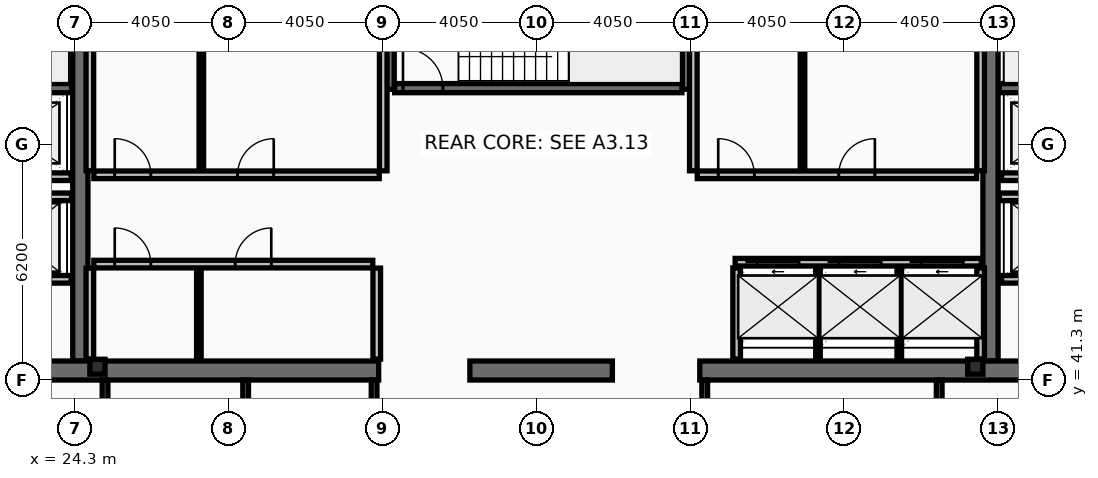
"""IFC4 building model, lengths in metres.
Left out: names, types, materials, properties, quantities, classifications, styles, units other than length and angle.
Written with IfcOpenShell. Run it as: python <this file> out.ifc"""

import sys

from ifc_helpers import new_model, si_unit, direction, frame, frame_2d, origin, origin_2d, place, context, subcontext, project, spatial, rectangle, i_section, extrude, element, fill, save


model = new_model("IFC4")
c1 = context("Model", 3, precision=1e-05, world=origin(), true_north=direction((0.0, 1.0)))
c2 = subcontext(c1, "Body", "Model", "MODEL_VIEW")
j1 = project(units=[si_unit("LENGTHUNIT", "METRE"), si_unit("PLANEANGLEUNIT", "RADIAN")], contexts=[c1])
p1 = place(None, origin())
s1 = spatial("IfcSite", under=j1, at=p1, CompositionType="ELEMENT")
p2 = place(p1, origin())
s2 = spatial("IfcBuilding", under=s1, at=p2, CompositionType="ELEMENT")
p3 = place(p2, frame((0.0, 0.0, 325.4)))
s3 = spatial("IfcBuildingStorey", under=s2, at=p3, CompositionType="ELEMENT", Elevation=325.4)
for number, where, z_axis, x_axis in (
    (1, (24.45, 41.8, 0.0), (0.0, 0.0, 1.0), (0.0, 1.0, 0.0)),
    (2, (48.4, 41.8, 0.0), (0.0, 0.0, 1.0), (0.0, 1.0, 0.0)),
):
    element("IfcWall", number, at=place(p3, frame(where, z_axis=z_axis, x_axis=x_axis)), inside=s3, PredefinedType="SHEAR", context=c2, shape_type="SweptSolid", body=[
        extrude(rectangle(XDim=11.4, YDim=0.4, at=frame_2d((5.7, 0.0))), origin(), (0.0, 0.0, 1.0), 3.44),
    ])
p4 = place(p3, frame((32.3, 41.55, 0.0), z_axis=(0.0, 0.0, 1.0), x_axis=(-1.0, 0.0, 0.0)))
e3 = element("IfcWall", 3, at=p4, inside=s3, PredefinedType="SHEAR", context=c2, shape_type="SweptSolid", body=[
    extrude(rectangle(XDim=11.45, YDim=0.5, at=frame_2d((5.725, 0.0))), origin(), (0.0, 0.0, 1.0), 3.44),
])
p5 = place(p3, frame((38.45, 41.55, 0.0), z_axis=(0.0, 0.0, 1.0), x_axis=(-1.0, 0.0, 0.0)))
e4 = element("IfcWall", 4, at=p5, inside=s3, PredefinedType="SHEAR", context=c2, shape_type="SweptSolid", body=[
    extrude(rectangle(XDim=3.75, YDim=0.5, at=frame_2d((1.875, 0.0))), origin(), (0.0, 0.0, 1.0), 3.44),
])
p6 = place(p3, frame((52.05, 41.55, 0.0), z_axis=(0.0, 0.0, 1.0), x_axis=(-1.0, 0.0, 0.0)))
e5 = element("IfcWall", 5, at=p6, inside=s3, PredefinedType="SHEAR", context=c2, shape_type="SweptSolid", body=[
    extrude(rectangle(XDim=11.3, YDim=0.5, at=frame_2d((5.65, 0.0))), origin(), (0.0, 0.0, 1.0), 3.44),
])
for number, where, z_axis, x_axis in (
    (6, (32.58, 48.95, 0.0), (0.0, 0.0, 1.0), (0.0, 1.0, 0.0)),
    (7, (40.42, 48.95, 0.0), (0.0, 0.0, 1.0), (0.0, 1.0, 0.0)),
):
    element("IfcWall", number, at=place(p3, frame(where, z_axis=z_axis, x_axis=x_axis)), inside=s3, PredefinedType="SHEAR", context=c2, shape_type="SweptSolid", body=[
        extrude(rectangle(XDim=4.25, YDim=0.26, at=frame_2d((2.125, 0.0))), origin(), (0.0, 0.0, 1.0), 3.44),
    ])
p7 = place(p3, frame((16.7, 48.98, 0.0), z_axis=(0.0, 0.0, 1.0), x_axis=(1.0, 0.0, 0.0)))
e8 = element("IfcWall", 8, at=p7, inside=s3, PredefinedType="SHEAR", context=c2, shape_type="SweptSolid", body=[
    extrude(rectangle(XDim=7.52, YDim=0.24, at=frame_2d((3.76, 0.0))), origin(), (0.0, 0.0, 1.0), 3.44),
])
p8 = place(p7, frame((0.22, 0.0, 0.0)))
e9 = element("IfcOpeningElement", 9, at=p8, cuts=e8, PredefinedType="OPENING", context=c2, shape_type="SweptSolid", body=[
    extrude(rectangle(XDim=1.05, YDim=2.15, at=frame_2d((0.525, 1.075))), frame((0.0, 0.13, 0.0), z_axis=(0.0, -1.0, 0.0), x_axis=(1.0, 0.0, 0.0)), (0.0, 0.0, 1.0), 0.26),
])
p9 = place(p3, frame((48.63, 48.98, 0.0), z_axis=(0.0, 0.0, 1.0), x_axis=(1.0, 0.0, 0.0)))
e10 = element("IfcWall", 10, at=p9, inside=s3, PredefinedType="SHEAR", context=c2, shape_type="SweptSolid", body=[
    extrude(rectangle(XDim=7.57, YDim=0.24, at=frame_2d((3.785, 0.0))), origin(), (0.0, 0.0, 1.0), 3.44),
])
p10 = place(p9, frame((6.3, 0.0, 0.0)))
e11 = element("IfcOpeningElement", 11, at=p10, cuts=e10, PredefinedType="OPENING", context=c2, shape_type="SweptSolid", body=[
    extrude(rectangle(XDim=1.05, YDim=2.15, at=frame_2d((0.525, 1.075))), frame((0.0, 0.13, 0.0), z_axis=(0.0, -1.0, 0.0), x_axis=(1.0, 0.0, 0.0)), (0.0, 0.0, 1.0), 0.26),
])
p11 = place(p3, frame((32.72, 48.98, 0.0), z_axis=(0.0, 0.0, 1.0), x_axis=(1.0, 0.0, 0.0)))
e12 = element("IfcWall", 12, at=p11, inside=s3, PredefinedType="SHEAR", context=c2, shape_type="SweptSolid", body=[
    extrude(rectangle(XDim=7.56, YDim=0.24, at=frame_2d((3.78, 0.0))), origin(), (0.0, 0.0, 1.0), 3.44),
])
p12 = place(p11, frame((0.22, 0.0, 0.0)))
e13 = element("IfcOpeningElement", 13, at=p12, cuts=e12, PredefinedType="OPENING", context=c2, shape_type="SweptSolid", body=[
    extrude(rectangle(XDim=1.05, YDim=2.15, at=frame_2d((0.525, 1.075))), frame((0.0, 0.13, 0.0), z_axis=(0.0, -1.0, 0.0), x_axis=(1.0, 0.0, 0.0)), (0.0, 0.0, 1.0), 0.26),
])
for number, where, z_axis, x_axis in (
    (14, (24.9, 41.65, 0.0), (0.0, 0.0, 1.0), (1.0, 0.0, 0.0)),
    (15, (48.0, 41.65, 0.0), (0.0, 0.0, 1.0), (1.0, 0.0, 0.0)),
):
    element("IfcColumn", number, at=place(p3, frame(where, z_axis=z_axis, x_axis=x_axis)), inside=s3, PredefinedType="COLUMN", context=c2, shape_type="SweptSolid", body=[
        extrude(i_section(OverallWidth=0.399, OverallDepth=0.393, WebThickness=0.023, FlangeThickness=0.037, at=origin_2d()), origin(), (0.0, 0.0, 1.0), 3.6),
    ])
p13 = place(p3, frame((41.68, 44.4, 0.0), z_axis=(0.0, 0.0, 1.0), x_axis=(1.0, 0.0, 0.0)))
e16 = element("IfcWall", 16, at=p13, inside=s3, PredefinedType="PARTITIONING", context=c2, shape_type="SweptSolid", body=[
    extrude(rectangle(XDim=6.48, YDim=0.2, at=frame_2d((3.24, 0.0))), origin(), (0.0, 0.0, 1.0), 3.44),
])
p14 = place(p13, frame((0.58, 0.0, 0.0)))
e17 = element("IfcOpeningElement", 17, at=p14, cuts=e16, PredefinedType="OPENING", context=c2, shape_type="SweptSolid", body=[
    extrude(rectangle(XDim=1.1, YDim=2.18, at=frame_2d((0.55, 1.09))), frame((0.0, 0.11, 0.0), z_axis=(0.0, -1.0, 0.0), x_axis=(1.0, 0.0, 0.0)), (0.0, 0.0, 1.0), 0.22),
])
p15 = place(p13, frame((2.74, 0.0, 0.0)))
e18 = element("IfcOpeningElement", 18, at=p15, cuts=e16, PredefinedType="OPENING", context=c2, shape_type="SweptSolid", body=[
    extrude(rectangle(XDim=1.1, YDim=2.18, at=frame_2d((0.55, 1.09))), frame((0.0, 0.11, 0.0), z_axis=(0.0, -1.0, 0.0), x_axis=(1.0, 0.0, 0.0)), (0.0, 0.0, 1.0), 0.22),
])
p16 = place(p13, frame((4.9, 0.0, 0.0)))
e19 = element("IfcOpeningElement", 19, at=p16, cuts=e16, PredefinedType="OPENING", context=c2, shape_type="SweptSolid", body=[
    extrude(rectangle(XDim=1.1, YDim=2.18, at=frame_2d((0.55, 1.09))), frame((0.0, 0.11, 0.0), z_axis=(0.0, -1.0, 0.0), x_axis=(1.0, 0.0, 0.0)), (0.0, 0.0, 1.0), 0.22),
])
p17 = place(p3, frame((51.61, 43.95, 0.0), z_axis=(0.0, 0.0, 1.0), x_axis=(-1.0, 0.0, 0.0)))
e20 = element("IfcWall", 20, at=p17, inside=s3, PredefinedType="PARTITIONING", context=c2, shape_type="SweptSolid", body=[
    extrude(rectangle(XDim=2.92, YDim=0.2, at=frame_2d((1.46, 0.0))), origin(), (0.0, 0.0, 1.0), 3.44),
])
p18 = place(p17, frame((0.81, 0.0, 0.0)))
e21 = element("IfcOpeningElement", 21, at=p18, cuts=e20, PredefinedType="OPENING", context=c2, shape_type="SweptSolid", body=[
    extrude(rectangle(XDim=1.3, YDim=2.18, at=frame_2d((0.65, 1.09))), frame((0.0, 0.11, 0.0), z_axis=(0.0, -1.0, 0.0), x_axis=(1.0, 0.0, 0.0)), (0.0, 0.0, 1.0), 0.22),
])
p19 = place(p3, frame((24.21, 43.95, 0.0), z_axis=(0.0, 0.0, 1.0), x_axis=(-1.0, 0.0, 0.0)))
e22 = element("IfcWall", 22, at=p19, inside=s3, PredefinedType="PARTITIONING", context=c2, shape_type="SweptSolid", body=[
    extrude(rectangle(XDim=2.97, YDim=0.2, at=frame_2d((1.485, 0.0))), origin(), (0.0, 0.0, 1.0), 3.44),
])
p20 = place(p19, frame((0.86, 0.0, 0.0)))
e23 = element("IfcOpeningElement", 23, at=p20, cuts=e22, PredefinedType="OPENING", context=c2, shape_type="SweptSolid", body=[
    extrude(rectangle(XDim=1.3, YDim=2.18, at=frame_2d((0.65, 1.09))), frame((0.0, 0.11, 0.0), z_axis=(0.0, -1.0, 0.0), x_axis=(1.0, 0.0, 0.0)), (0.0, 0.0, 1.0), 0.22),
])
p21 = place(p3, frame((51.61, 46.65, 0.0), z_axis=(0.0, 0.0, 1.0), x_axis=(-1.0, 0.0, 0.0)))
e24 = element("IfcWall", 24, at=p21, inside=s3, PredefinedType="PARTITIONING", context=c2, shape_type="SweptSolid", body=[
    extrude(rectangle(XDim=2.92, YDim=0.2, at=frame_2d((1.46, 0.0))), origin(), (0.0, 0.0, 1.0), 3.44),
])
p22 = place(p21, frame((0.86, 0.0, 0.0)))
e25 = element("IfcOpeningElement", 25, at=p22, cuts=e24, PredefinedType="OPENING", context=c2, shape_type="SweptSolid", body=[
    extrude(rectangle(XDim=1.2, YDim=2.18, at=frame_2d((0.6, 1.09))), frame((0.0, 0.11, 0.0), z_axis=(0.0, -1.0, 0.0), x_axis=(1.0, 0.0, 0.0)), (0.0, 0.0, 1.0), 0.22),
])
p23 = place(p3, frame((24.21, 46.65, 0.0), z_axis=(0.0, 0.0, 1.0), x_axis=(-1.0, 0.0, 0.0)))
e26 = element("IfcWall", 26, at=p23, inside=s3, PredefinedType="PARTITIONING", context=c2, shape_type="SweptSolid", body=[
    extrude(rectangle(XDim=2.97, YDim=0.2, at=frame_2d((1.485, 0.0))), origin(), (0.0, 0.0, 1.0), 3.44),
])
p24 = place(p23, frame((0.91, 0.0, 0.0)))
e27 = element("IfcOpeningElement", 27, at=p24, cuts=e26, PredefinedType="OPENING", context=c2, shape_type="SweptSolid", body=[
    extrude(rectangle(XDim=1.2, YDim=2.18, at=frame_2d((0.6, 1.09))), frame((0.0, 0.11, 0.0), z_axis=(0.0, -1.0, 0.0), x_axis=(1.0, 0.0, 0.0)), (0.0, 0.0, 1.0), 0.22),
])
p25 = place(p3, frame((21.2, 46.12, 0.0), z_axis=(0.0, 0.0, 1.0), x_axis=(1.0, 0.0, 0.0)))
e28 = element("IfcWall", 28, at=p25, inside=s3, PredefinedType="PARTITIONING", context=c2, shape_type="SweptSolid", body=[
    extrude(rectangle(XDim=3.02, YDim=0.2, at=frame_2d((1.51, 0.0))), origin(), (0.0, 0.0, 1.0), 3.44),
])
p26 = place(p3, frame((48.63, 46.12, 0.0), z_axis=(0.0, 0.0, 1.0), x_axis=(1.0, 0.0, 0.0)))
e29 = element("IfcWall", 29, at=p26, inside=s3, PredefinedType="PARTITIONING", context=c2, shape_type="SweptSolid", body=[
    extrude(rectangle(XDim=3.07, YDim=0.2, at=frame_2d((1.535, 0.0))), origin(), (0.0, 0.0, 1.0), 3.44),
])
for number, where, z_axis, x_axis in (
    (30, (24.7, 46.805, 0.0), (0.0, 0.0, 1.0), (0.0, 1.0, 0.0)),
    (31, (32.42, 46.805, 0.0), (0.0, 0.0, 1.0), (0.0, 1.0, 0.0)),
):
    element("IfcWall", number, at=place(p3, frame(where, z_axis=z_axis, x_axis=x_axis)), inside=s3, PredefinedType="PARTITIONING", context=c2, shape_type="SweptSolid", body=[
        extrude(rectangle(XDim=5.99, YDim=0.2, at=frame_2d((2.995, 0.0))), origin(), (0.0, 0.0, 1.0), 3.44),
    ])
p27 = place(p3, frame((27.634, 46.805, 0.0), z_axis=(0.0, 0.0, 1.0), x_axis=(0.0, 1.0, 0.0)))
e32 = element("IfcWall", 32, at=p27, inside=s3, PredefinedType="PARTITIONING", context=c2, shape_type="SweptSolid", body=[
    extrude(rectangle(XDim=5.99, YDim=0.12, at=frame_2d((2.995, 0.0))), origin(), (0.0, 0.0, 1.0), 3.44),
])
p28 = place(p3, frame((24.805, 46.7, 0.0), z_axis=(0.0, 0.0, 1.0), x_axis=(1.0, 0.0, 0.0)))
e33 = element("IfcWall", 33, at=p28, inside=s3, PredefinedType="PARTITIONING", context=c2, shape_type="SweptSolid", body=[
    extrude(rectangle(XDim=7.51, YDim=0.2, at=frame_2d((3.755, 0.0))), origin(), (0.0, 0.0, 1.0), 3.44),
])
p29 = place(p28, frame((0.55, 0.0, 0.0)))
e34 = element("IfcOpeningElement", 34, at=p29, cuts=e33, PredefinedType="OPENING", context=c2, shape_type="SweptSolid", body=[
    extrude(rectangle(XDim=0.95, YDim=2.1, at=frame_2d((0.475, 1.05))), frame((0.0, 0.11, 0.0), z_axis=(0.0, -1.0, 0.0), x_axis=(1.0, 0.0, 0.0)), (0.0, 0.0, 1.0), 0.22),
])
p30 = place(p28, frame((3.784, 0.0, 0.0)))
e35 = element("IfcOpeningElement", 35, at=p30, cuts=e33, PredefinedType="OPENING", context=c2, shape_type="SweptSolid", body=[
    extrude(rectangle(XDim=0.95, YDim=2.1, at=frame_2d((0.475, 1.05))), frame((0.0, 0.11, 0.0), z_axis=(0.0, -1.0, 0.0), x_axis=(1.0, 0.0, 0.0)), (0.0, 0.0, 1.0), 0.22),
])
for number, where, z_axis, x_axis in (
    (36, (24.7, 41.85, 0.0), (0.0, 0.0, 1.0), (0.0, 1.0, 0.0)),
    (37, (32.25, 41.85, 0.0), (0.0, 0.0, 1.0), (0.0, 1.0, 0.0)),
):
    element("IfcWall", number, at=place(p3, frame(where, z_axis=z_axis, x_axis=x_axis)), inside=s3, PredefinedType="PARTITIONING", context=c2, shape_type="SweptSolid", body=[
        extrude(rectangle(XDim=2.395, YDim=0.2, at=frame_2d((1.198, 0.0))), origin(), (0.0, 0.0, 1.0), 3.44),
    ])
p31 = place(p3, frame((27.569, 41.85, 0.0), z_axis=(0.0, 0.0, 1.0), x_axis=(0.0, 1.0, 0.0)))
e38 = element("IfcWall", 38, at=p31, inside=s3, PredefinedType="PARTITIONING", context=c2, shape_type="SweptSolid", body=[
    extrude(rectangle(XDim=2.395, YDim=0.12, at=frame_2d((1.198, 0.0))), origin(), (0.0, 0.0, 1.0), 3.44),
])
p32 = place(p3, frame((24.805, 44.35, 0.0), z_axis=(0.0, 0.0, 1.0), x_axis=(1.0, 0.0, 0.0)))
e39 = element("IfcWall", 39, at=p32, inside=s3, PredefinedType="PARTITIONING", context=c2, shape_type="SweptSolid", body=[
    extrude(rectangle(XDim=7.34, YDim=0.2, at=frame_2d((3.67, 0.0))), origin(), (0.0, 0.0, 1.0), 3.44),
])
p33 = place(p32, frame((0.55, 0.0, 0.0)))
e40 = element("IfcOpeningElement", 40, at=p33, cuts=e39, PredefinedType="OPENING", context=c2, shape_type="SweptSolid", body=[
    extrude(rectangle(XDim=0.95, YDim=2.1, at=frame_2d((0.475, 1.05))), frame((0.0, 0.11, 0.0), z_axis=(0.0, -1.0, 0.0), x_axis=(1.0, 0.0, 0.0)), (0.0, 0.0, 1.0), 0.22),
])
p34 = place(p32, frame((3.719, 0.0, 0.0)))
e41 = element("IfcOpeningElement", 41, at=p34, cuts=e39, PredefinedType="OPENING", context=c2, shape_type="SweptSolid", body=[
    extrude(rectangle(XDim=0.95, YDim=2.1, at=frame_2d((0.475, 1.05))), frame((0.0, 0.11, 0.0), z_axis=(0.0, -1.0, 0.0), x_axis=(1.0, 0.0, 0.0)), (0.0, 0.0, 1.0), 0.22),
])
for number, where, z_axis, x_axis in (
    (42, (40.58, 46.805, 0.0), (0.0, 0.0, 1.0), (0.0, 1.0, 0.0)),
    (43, (48.14, 46.805, 0.0), (0.0, 0.0, 1.0), (0.0, 1.0, 0.0)),
):
    element("IfcWall", number, at=place(p3, frame(where, z_axis=z_axis, x_axis=x_axis)), inside=s3, PredefinedType="PARTITIONING", context=c2, shape_type="SweptSolid", body=[
        extrude(rectangle(XDim=5.99, YDim=0.2, at=frame_2d((2.995, 0.0))), origin(), (0.0, 0.0, 1.0), 3.44),
    ])
p35 = place(p3, frame((43.453, 46.805, 0.0), z_axis=(0.0, 0.0, 1.0), x_axis=(0.0, 1.0, 0.0)))
e44 = element("IfcWall", 44, at=p35, inside=s3, PredefinedType="PARTITIONING", context=c2, shape_type="SweptSolid", body=[
    extrude(rectangle(XDim=5.99, YDim=0.12, at=frame_2d((2.995, 0.0))), origin(), (0.0, 0.0, 1.0), 3.44),
])
p36 = place(p3, frame((40.685, 46.7, 0.0), z_axis=(0.0, 0.0, 1.0), x_axis=(1.0, 0.0, 0.0)))
e45 = element("IfcWall", 45, at=p36, inside=s3, PredefinedType="PARTITIONING", context=c2, shape_type="SweptSolid", body=[
    extrude(rectangle(XDim=7.35, YDim=0.2, at=frame_2d((3.675, 0.0))), origin(), (0.0, 0.0, 1.0), 3.44),
])
p37 = place(p36, frame((0.55, 0.0, 0.0)))
e46 = element("IfcOpeningElement", 46, at=p37, cuts=e45, PredefinedType="OPENING", context=c2, shape_type="SweptSolid", body=[
    extrude(rectangle(XDim=0.95, YDim=2.1, at=frame_2d((0.475, 1.05))), frame((0.0, 0.11, 0.0), z_axis=(0.0, -1.0, 0.0), x_axis=(1.0, 0.0, 0.0)), (0.0, 0.0, 1.0), 0.22),
])
p38 = place(p36, frame((3.723, 0.0, 0.0)))
e47 = element("IfcOpeningElement", 47, at=p38, cuts=e45, PredefinedType="OPENING", context=c2, shape_type="SweptSolid", body=[
    extrude(rectangle(XDim=0.95, YDim=2.1, at=frame_2d((0.475, 1.05))), frame((0.0, 0.11, 0.0), z_axis=(0.0, -1.0, 0.0), x_axis=(1.0, 0.0, 0.0)), (0.0, 0.0, 1.0), 0.22),
])
for number, where, z_axis, x_axis in (
    (48, (41.72, 41.85, 0.0), (0.0, 0.0, 1.0), (0.0, 1.0, 0.0)),
    (49, (48.14, 41.85, 0.0), (0.0, 0.0, 1.0), (0.0, 1.0, 0.0)),
):
    element("IfcWall", number, at=place(p3, frame(where, z_axis=z_axis, x_axis=x_axis)), inside=s3, PredefinedType="PARTITIONING", context=c2, shape_type="SweptSolid", body=[
        extrude(rectangle(XDim=2.4, YDim=0.2, at=frame_2d((1.2, 0.0))), origin(), (0.0, 0.0, 1.0), 3.44),
    ])
for number, where, z_axis, x_axis in (
    (50, (43.86, 41.85, 0.0), (0.0, 0.0, 1.0), (0.0, 1.0, 0.0)),
    (51, (46.0, 41.85, 0.0), (0.0, 0.0, 1.0), (0.0, 1.0, 0.0)),
):
    element("IfcWall", number, at=place(p3, frame(where, z_axis=z_axis, x_axis=x_axis)), inside=s3, PredefinedType="PARTITIONING", context=c2, shape_type="SweptSolid", body=[
        extrude(rectangle(XDim=2.4, YDim=0.12, at=frame_2d((1.2, 0.0))), origin(), (0.0, 0.0, 1.0), 3.44),
    ])
p39 = place(p3, frame((25.1, 38.28, 0.0), z_axis=(0.0, 0.0, 1.0), x_axis=(0.0, 1.0, 0.0)))
e52 = element("IfcWall", 52, at=p39, inside=s3, PredefinedType="PARTITIONING", context=c2, shape_type="SweptSolid", body=[
    extrude(rectangle(XDim=3.02, YDim=0.15, at=frame_2d((1.51, 0.0))), origin(), (0.0, 0.0, 1.0), 2.83),
])
for number, where, z_axis, x_axis in (
    (53, (28.8, 38.28, 0.0), (0.0, 0.0, 1.0), (0.0, 1.0, 0.0)),
    (54, (32.18, 38.28, 0.0), (0.0, 0.0, 1.0), (0.0, 1.0, 0.0)),
    (55, (40.88, 38.28, 0.0), (0.0, 0.0, 1.0), (0.0, 1.0, 0.0)),
    (56, (47.05, 38.28, 0.0), (0.0, 0.0, 1.0), (0.0, 1.0, 0.0)),
):
    element("IfcWall", number, at=place(p3, frame(where, z_axis=z_axis, x_axis=x_axis)), inside=s3, PredefinedType="PARTITIONING", context=c2, shape_type="SweptSolid", body=[
        extrude(rectangle(XDim=3.02, YDim=0.15, at=frame_2d((1.51, 0.0))), origin(), (0.0, 0.0, 1.0), 3.44),
    ])
p40 = place(p12, origin())
e57 = element("IfcDoor", 57, at=p40, inside=s3, OperationType="SINGLE_SWING_LEFT", PredefinedType="DOOR", context=c2, shape_type="SweptSolid", body=[
    extrude(rectangle(XDim=1.05, YDim=2.15, at=frame_2d((0.525, 1.075))), frame((0.0, 0.025, 0.0), z_axis=(0.0, -1.0, 0.0), x_axis=(1.0, 0.0, 0.0)), (0.0, 0.0, 1.0), 0.05),
])
fill(e13, e57)
p41 = place(p14, origin())
e58 = element("IfcDoor", 58, at=p41, inside=s3, OperationType="SLIDING_TO_LEFT", PredefinedType="DOOR", context=c2, shape_type="SweptSolid", body=[
    extrude(rectangle(XDim=1.1, YDim=2.18, at=frame_2d((0.55, 1.09))), frame((0.0, 0.025, 0.0), z_axis=(0.0, -1.0, 0.0), x_axis=(1.0, 0.0, 0.0)), (0.0, 0.0, 1.0), 0.05),
])
fill(e17, e58)
p42 = place(p15, origin())
e59 = element("IfcDoor", 59, at=p42, inside=s3, OperationType="SLIDING_TO_LEFT", PredefinedType="DOOR", context=c2, shape_type="SweptSolid", body=[
    extrude(rectangle(XDim=1.1, YDim=2.18, at=frame_2d((0.55, 1.09))), frame((0.0, 0.025, 0.0), z_axis=(0.0, -1.0, 0.0), x_axis=(1.0, 0.0, 0.0)), (0.0, 0.0, 1.0), 0.05),
])
fill(e18, e59)
p43 = place(p16, origin())
e60 = element("IfcDoor", 60, at=p43, inside=s3, OperationType="SLIDING_TO_LEFT", PredefinedType="DOOR", context=c2, shape_type="SweptSolid", body=[
    extrude(rectangle(XDim=1.1, YDim=2.18, at=frame_2d((0.55, 1.09))), frame((0.0, 0.025, 0.0), z_axis=(0.0, -1.0, 0.0), x_axis=(1.0, 0.0, 0.0)), (0.0, 0.0, 1.0), 0.05),
])
fill(e19, e60)
p44 = place(p29, origin())
e61 = element("IfcDoor", 61, at=p44, inside=s3, OperationType="SINGLE_SWING_LEFT", PredefinedType="DOOR", context=c2, shape_type="SweptSolid", body=[
    extrude(rectangle(XDim=0.95, YDim=2.1, at=frame_2d((0.475, 1.05))), frame((0.0, 0.025, 0.0), z_axis=(0.0, -1.0, 0.0), x_axis=(1.0, 0.0, 0.0)), (0.0, 0.0, 1.0), 0.05),
])
fill(e34, e61)
p45 = place(p30, origin())
e62 = element("IfcDoor", 62, at=p45, inside=s3, OperationType="SINGLE_SWING_RIGHT", PredefinedType="DOOR", context=c2, shape_type="SweptSolid", body=[
    extrude(rectangle(XDim=0.95, YDim=2.1, at=frame_2d((0.475, 1.05))), frame((0.0, 0.025, 0.0), z_axis=(0.0, -1.0, 0.0), x_axis=(1.0, 0.0, 0.0)), (0.0, 0.0, 1.0), 0.05),
])
fill(e35, e62)
p46 = place(p33, origin())
e63 = element("IfcDoor", 63, at=p46, inside=s3, OperationType="SINGLE_SWING_LEFT", PredefinedType="DOOR", context=c2, shape_type="SweptSolid", body=[
    extrude(rectangle(XDim=0.95, YDim=2.1, at=frame_2d((0.475, 1.05))), frame((0.0, 0.025, 0.0), z_axis=(0.0, -1.0, 0.0), x_axis=(1.0, 0.0, 0.0)), (0.0, 0.0, 1.0), 0.05),
])
fill(e40, e63)
p47 = place(p34, origin())
e64 = element("IfcDoor", 64, at=p47, inside=s3, OperationType="SINGLE_SWING_RIGHT", PredefinedType="DOOR", context=c2, shape_type="SweptSolid", body=[
    extrude(rectangle(XDim=0.95, YDim=2.1, at=frame_2d((0.475, 1.05))), frame((0.0, 0.025, 0.0), z_axis=(0.0, -1.0, 0.0), x_axis=(1.0, 0.0, 0.0)), (0.0, 0.0, 1.0), 0.05),
])
fill(e41, e64)
p48 = place(p37, origin())
e65 = element("IfcDoor", 65, at=p48, inside=s3, OperationType="SINGLE_SWING_LEFT", PredefinedType="DOOR", context=c2, shape_type="SweptSolid", body=[
    extrude(rectangle(XDim=0.95, YDim=2.1, at=frame_2d((0.475, 1.05))), frame((0.0, 0.025, 0.0), z_axis=(0.0, -1.0, 0.0), x_axis=(1.0, 0.0, 0.0)), (0.0, 0.0, 1.0), 0.05),
])
fill(e46, e65)
p49 = place(p38, origin())
e66 = element("IfcDoor", 66, at=p49, inside=s3, OperationType="SINGLE_SWING_RIGHT", PredefinedType="DOOR", context=c2, shape_type="SweptSolid", body=[
    extrude(rectangle(XDim=0.95, YDim=2.1, at=frame_2d((0.475, 1.05))), frame((0.0, 0.025, 0.0), z_axis=(0.0, -1.0, 0.0), x_axis=(1.0, 0.0, 0.0)), (0.0, 0.0, 1.0), 0.05),
])
fill(e47, e66)
save(model, sys.argv[1])
